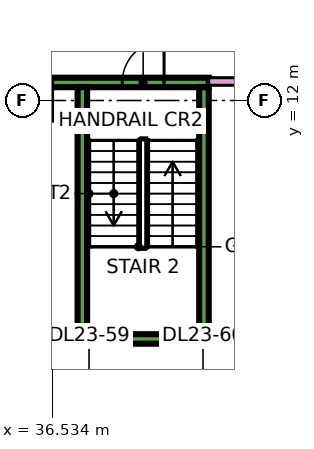
"""IFC4 building model, lengths in metres.
Left out: names, types, materials, properties, quantities, classifications, styles, units other than length and angle.
Written with IfcOpenShell. Run it as: python <this file> out.ifc"""

import sys

from ifc_helpers import new_model, si_unit, direction, frame, frame_2d, origin, place, context, subcontext, project, spatial, rectangle, extrude, element, fill, save


model = new_model("IFC4")
c1 = context("Model", 3, precision=1e-05, world=origin(), true_north=direction((0.0, 1.0)))
c2 = subcontext(c1, "Body", "Model", "MODEL_VIEW")
j1 = project(units=[si_unit("LENGTHUNIT", "METRE"), si_unit("PLANEANGLEUNIT", "RADIAN")], contexts=[c1])
p1 = place(None, origin())
s1 = spatial("IfcSite", under=j1, at=p1, CompositionType="ELEMENT")
p2 = place(p1, origin())
s2 = spatial("IfcBuilding", under=s1, at=p2, CompositionType="ELEMENT")
p3 = place(p2, frame((0.0, 0.0, 103.15)))
s3 = spatial("IfcBuildingStorey", under=s2, at=p3, CompositionType="ELEMENT", Elevation=103.15)
p4 = place(p3, frame((37.2, 5.725, 0.0), z_axis=(0.0, 0.0, 1.0), x_axis=(1.0, 0.0, 0.0)))
e1 = element("IfcWall", 1, at=p4, inside=s3, PredefinedType="SHEAR", context=c2, shape_type="SweptSolid", body=[
    extrude(rectangle(XDim=3.45, YDim=0.25, at=frame_2d((1.725, 0.0))), origin(), (0.0, 0.0, 1.0), 3.75),
])
p5 = place(p3, frame((36.5, 12.475, 0.0), z_axis=(0.0, 0.0, 1.0), x_axis=(1.0, 0.0, 0.0)))
e2 = element("IfcWall", 2, at=p5, inside=s3, PredefinedType="SHEAR", context=c2, shape_type="SweptSolid", body=[
    extrude(rectangle(XDim=4.15, YDim=0.25, at=frame_2d((2.075, 0.0))), origin(), (0.0, 0.0, 1.0), 3.75),
])
p6 = place(p5, frame((1.875, 0.0, 0.0)))
e3 = element("IfcOpeningElement", 3, at=p6, cuts=e2, PredefinedType="OPENING", context=c2, shape_type="SweptSolid", body=[
    extrude(rectangle(XDim=1.1, YDim=2.2, at=frame_2d((0.55, 1.1))), frame((0.0, 0.135, 0.0), z_axis=(0.0, -1.0, 0.0), x_axis=(1.0, 0.0, 0.0)), (0.0, 0.0, 1.0), 0.27),
])
for number, where, z_axis, x_axis in (
    (4, (37.325, 5.85, 0.0), (0.0, 0.0, 1.0), (0.0, 1.0, 0.0)),
    (5, (40.525, 5.85, 0.0), (0.0, 0.0, 1.0), (0.0, 1.0, 0.0)),
):
    element("IfcWall", number, at=place(p3, frame(where, z_axis=z_axis, x_axis=x_axis)), inside=s3, PredefinedType="SHEAR", context=c2, shape_type="SweptSolid", body=[
        extrude(rectangle(XDim=6.5, YDim=0.25, at=frame_2d((3.25, 0.0))), origin(), (0.0, 0.0, 1.0), 3.75),
    ])
p7 = place(p3, frame((40.65, 12.5, 0.0), z_axis=(0.0, 0.0, 1.0), x_axis=(1.0, 0.0, 0.0)))
e6 = element("IfcWall", 6, at=p7, inside=s3, PredefinedType="PARTITIONING", context=c2, shape_type="SweptSolid", body=[
    extrude(rectangle(XDim=31.276, YDim=0.2, at=frame_2d((15.638, 0.0))), origin(), (0.0, 0.0, 1.0), 3.35),
])
p8 = place(p7, frame((14.25, 0.0, 0.0)))
e7 = element("IfcOpeningElement", 7, at=p8, cuts=e6, PredefinedType="OPENING", context=c2, shape_type="SweptSolid", body=[
    extrude(rectangle(XDim=1.0, YDim=2.1, at=frame_2d((0.5, 1.05))), frame((0.0, 0.11, 0.0), z_axis=(0.0, -1.0, 0.0), x_axis=(1.0, 0.0, 0.0)), (0.0, 0.0, 1.0), 0.22),
])
p9 = place(p7, frame((1.05, 0.0, 0.0)))
e8 = element("IfcOpeningElement", 8, at=p9, cuts=e6, PredefinedType="OPENING", context=c2, shape_type="SweptSolid", body=[
    extrude(rectangle(XDim=1.0, YDim=2.1, at=frame_2d((0.5, 1.05))), frame((0.0, 0.11, 0.0), z_axis=(0.0, -1.0, 0.0), x_axis=(1.0, 0.0, 0.0)), (0.0, 0.0, 1.0), 0.22),
])
p10 = place(p6, frame((1.1, 0.0, 0.0), z_axis=(0.0, 0.0, 1.0), x_axis=(-1.0, 0.0, 0.0)))
e9 = element("IfcDoor", 9, at=p10, inside=s3, OperationType="SINGLE_SWING_RIGHT", PredefinedType="DOOR", context=c2, shape_type="SweptSolid", body=[
    extrude(rectangle(XDim=1.1, YDim=2.2, at=frame_2d((0.55, 1.1))), frame((0.0, 0.025, 0.0), z_axis=(0.0, -1.0, 0.0), x_axis=(1.0, 0.0, 0.0)), (0.0, 0.0, 1.0), 0.05),
])
fill(e3, e9)
save(model, sys.argv[1])
